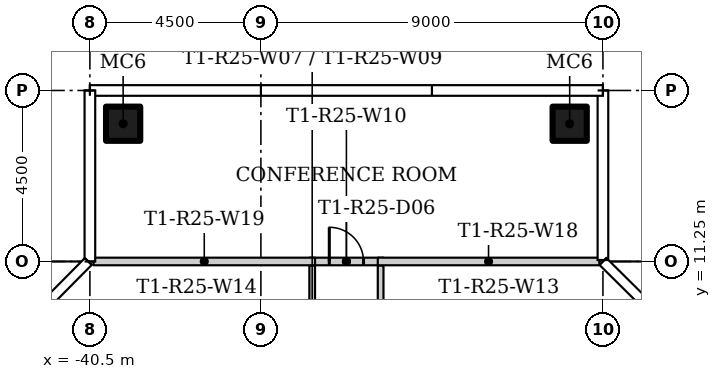
"""IFC4 building model, lengths in metres.
Left out: names, types, materials, properties, quantities, classifications, styles, units other than length and angle.
Written with IfcOpenShell. Run it as: python <this file> out.ifc"""

import sys

from ifc_helpers import new_model, si_unit, direction, frame, frame_2d, origin, origin_2d, place, context, subcontext, project, spatial, rectangle, hollow_rectangle, extrude, element, fill, save


model = new_model("IFC4")
c1 = context("Model", 3, precision=1e-05, world=origin(), true_north=direction((0.0, 1.0)))
c2 = subcontext(c1, "Body", "Model", "MODEL_VIEW")
j1 = project(units=[si_unit("LENGTHUNIT", "METRE"), si_unit("PLANEANGLEUNIT", "RADIAN")], contexts=[c1])
p1 = place(None, origin())
s1 = spatial("IfcSite", under=j1, at=p1, CompositionType="ELEMENT")
p2 = place(p1, origin())
s2 = spatial("IfcBuilding", under=s1, at=p2, CompositionType="ELEMENT")
p3 = place(p2, frame((0.0, 0.0, 230.4)))
s3 = spatial("IfcBuildingStorey", under=s2, at=p3, CompositionType="ELEMENT", Elevation=230.4)
for number, where in (
    (1, (-39.625, 14.875, 0.0)),
    (2, (-27.875, 14.875, 0.0)),
):
    element("IfcColumn", number, at=place(p3, frame(where)), inside=s3, PredefinedType="COLUMN", context=c2, shape_type="SweptSolid", body=[
        extrude(hollow_rectangle(XDim=0.9, YDim=0.9, WallThickness=0.036, at=origin_2d()), origin(), (0.0, 0.0, 1.0), 3.55),
    ])
p4 = place(p3, frame((-32.85, 11.15, 0.0), z_axis=(0.0, 0.0, 1.0), x_axis=(0.0, -1.0, 0.0)))
e3 = element("IfcWall", 3, at=p4, inside=s3, PredefinedType="PARTITIONING", context=c2, shape_type="SweptSolid", body=[
    extrude(rectangle(XDim=8.625, YDim=0.15, at=frame_2d((4.312, 0.0))), origin(), (0.0, 0.0, 1.0), 3.55),
])
p5 = place(p4, frame((1.65, 0.0, 0.0)))
e4 = element("IfcOpeningElement", 4, at=p5, cuts=e3, PredefinedType="OPENING", context=c2, shape_type="SweptSolid", body=[
    extrude(rectangle(XDim=1.0, YDim=2.4, at=frame_2d((0.5, 1.2))), frame((0.0, 0.085, 0.0), z_axis=(0.0, -1.0, 0.0), x_axis=(1.0, 0.0, 0.0)), (0.0, 0.0, 1.0), 0.17),
])
p6 = place(p3, frame((-34.65, 6.825, 0.0), z_axis=(0.0, 0.0, 1.0), x_axis=(0.0, 1.0, 0.0)))
e5 = element("IfcWall", 5, at=p6, inside=s3, PredefinedType="PARTITIONING", context=c2, shape_type="SweptSolid", body=[
    extrude(rectangle(XDim=4.325, YDim=0.15, at=frame_2d((2.163, 0.0))), origin(), (0.0, 0.0, 1.0), 3.55),
])
p7 = place(p6, frame((1.425, 0.0, 0.0)))
e6 = element("IfcOpeningElement", 6, at=p7, cuts=e5, PredefinedType="OPENING", context=c2, shape_type="SweptSolid", body=[
    extrude(rectangle(XDim=1.5, YDim=2.1, at=frame_2d((0.75, 1.05))), frame((0.0, 0.085, 0.0), z_axis=(0.0, -1.0, 0.0), x_axis=(1.0, 0.0, 0.0)), (0.0, 0.0, 1.0), 0.17),
])
p8 = place(p3, frame((-34.725, 11.25, 0.0)))
e7 = element("IfcWall", 7, at=p8, inside=s3, PredefinedType="PARTITIONING", context=c2, shape_type="SweptSolid", body=[
    extrude(rectangle(XDim=1.951, YDim=0.2, at=frame_2d((0.975, 0.0))), origin(), (0.0, 0.0, 1.0), 3.55),
])
p9 = place(p8, frame((0.525, 0.0, 0.0)))
e8 = element("IfcOpeningElement", 8, at=p9, cuts=e7, PredefinedType="OPENING", context=c2, shape_type="SweptSolid", body=[
    extrude(rectangle(XDim=0.9, YDim=2.4, at=frame_2d((0.45, 1.2))), frame((0.0, 0.11, 0.0), z_axis=(0.0, -1.0, 0.0), x_axis=(1.0, 0.0, 0.0)), (0.0, 0.0, 1.0), 0.22),
])
for number, where, z_axis, x_axis in (
    (9, (-27.095, 11.25, 0.0), (0.0, 0.0, 1.0), (-1.0, 0.0, 0.0)),
    (10, (-34.575, 11.25, 0.0), (0.0, 0.0, 1.0), (-1.0, 0.0, 0.0)),
):
    element("IfcWall", number, at=place(p3, frame(where, z_axis=z_axis, x_axis=x_axis)), inside=s3, PredefinedType="PARTITIONING", context=c2, shape_type="SweptSolid", body=[
        extrude(rectangle(XDim=5.83, YDim=0.2, at=frame_2d((2.915, 0.0))), origin(), (0.0, 0.0, 1.0), 3.55),
    ])
p10 = place(p9, origin())
e11 = element("IfcDoor", 11, at=p10, inside=s3, OperationType="SINGLE_SWING_LEFT", PredefinedType="DOOR", context=c2, shape_type="SweptSolid", body=[
    extrude(rectangle(XDim=0.9, YDim=2.4, at=frame_2d((0.45, 1.2))), frame((0.0, 0.025, 0.0), z_axis=(0.0, -1.0, 0.0), x_axis=(1.0, 0.0, 0.0)), (0.0, 0.0, 1.0), 0.05),
])
fill(e8, e11)
save(model, sys.argv[1])
